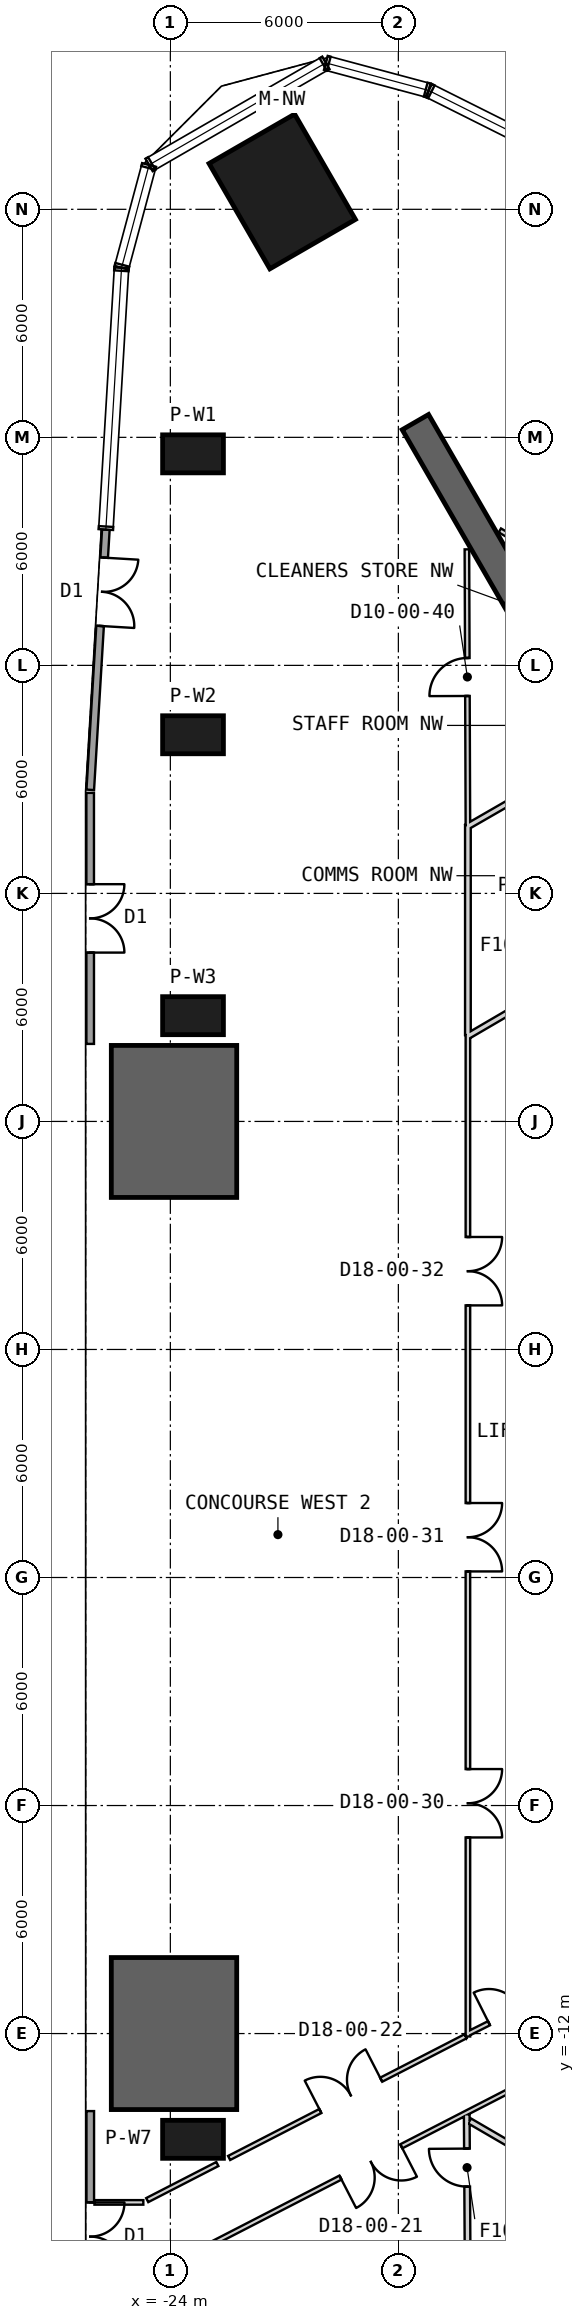
"""IFC4 building model, lengths in metres.
Left out: names, types, materials, properties, quantities, classifications, styles, units other than length and angle.
Written with IfcOpenShell. Run it as: python <this file> out.ifc"""

import sys

from ifc_helpers import new_model, si_unit, direction, frame, frame_2d, origin, origin_2d, place, context, subcontext, project, spatial, polyline, rectangle, outline, extrude, element, fill, save


model = new_model("IFC4")
c1 = context("Model", 3, precision=1e-05, world=origin(), true_north=direction((0.0, 1.0)))
c2 = subcontext(c1, "Body", "Model", "MODEL_VIEW")
j1 = project(units=[si_unit("LENGTHUNIT", "METRE"), si_unit("PLANEANGLEUNIT", "RADIAN")], contexts=[c1])
p1 = place(None, origin())
s1 = spatial("IfcSite", under=j1, at=p1, CompositionType="ELEMENT")
p2 = place(p1, origin())
s2 = spatial("IfcBuilding", under=s1, at=p2, CompositionType="ELEMENT")
p3 = place(p2, origin())
s3 = spatial("IfcBuildingStorey", under=s2, at=p3, CompositionType="ELEMENT", Elevation=0.0)
p4 = place(p3, frame((-21.056, 36.469, 0.0), z_axis=(0.0, 0.0, 1.0), x_axis=(-0.5, 0.866025403784, 0.0)))
e1 = element("IfcColumn", 1, at=p4, inside=s3, PredefinedType="COLUMN", context=c2, shape_type="SweptSolid", body=[
    extrude(rectangle(XDim=3.2, YDim=2.6, at=origin_2d()), origin(), (0.0, 0.0, 1.0), 9.0),
])
for number, where, z_axis, x_axis in (
    (2, (-23.403, 29.566, 0.0), (0.0, 0.0, 1.0), (-1.0, 0.0, 0.0)),
    (3, (-23.403, 22.174, 0.0), (0.0, 0.0, 1.0), (-1.0, 0.0, 0.0)),
    (4, (-23.403, 14.783, 0.0), (0.0, 0.0, 1.0), (-1.0, 0.0, 0.0)),
    (5, (-23.403, -14.783, 0.0), (0.0, 0.0, 1.0), (-1.0, 0.0, 0.0)),
):
    element("IfcColumn", number, at=place(p3, frame(where, z_axis=z_axis, x_axis=x_axis)), inside=s3, PredefinedType="COLUMN", context=c2, shape_type="SweptSolid", body=[
        extrude(rectangle(XDim=1.6, YDim=1.0, at=origin_2d()), origin(), (0.0, 0.0, 1.0), 9.0),
    ])
p5 = place(p3, frame((-10.575, 18.316, 0.0), z_axis=(0.0, 0.0, 1.0), x_axis=(-0.499996575515, 0.866027380903, 0.0)))
e6 = element("IfcWall", 6, at=p5, inside=s3, PredefinedType="SHEAR", context=c2, shape_type="SweptSolid", body=[
    extrude(rectangle(XDim=13.954, YDim=0.8, at=frame_2d((6.977, 0.0))), origin(), (0.0, 0.0, 1.0), 9.0),
])
p6 = place(p5, frame((2.05, 0.0, 0.0)))
e7 = element("IfcOpeningElement", 7, at=p6, cuts=e6, PredefinedType="OPENING", context=c2, shape_type="SweptSolid", body=[
    extrude(rectangle(XDim=1.4, YDim=2.4, at=frame_2d((0.7, 1.2))), frame((0.0, 0.41, 0.0), z_axis=(0.0, -1.0, 0.0), x_axis=(1.0, 0.0, 0.0)), (0.0, 0.0, 1.0), 0.82),
])
p7 = place(p3, origin())
e8 = element("IfcWall", 8, at=p7, inside=s3, PredefinedType="SHEAR", context=c2, shape_type="SweptSolid", body=[
    extrude(outline(polyline([(-25.553, 14.0), (-25.553, 10.0), (-22.253, 10.0), (-22.253, 14.0), (-25.553, 14.0)])), origin(), (0.0, 0.0, 1.0), 9.0),
])
p8 = place(p3, origin())
e9 = element("IfcWall", 9, at=p8, inside=s3, PredefinedType="SHEAR", context=c2, shape_type="SweptSolid", body=[
    extrude(outline(polyline([(-25.553, -10.0), (-25.553, -14.0), (-22.253, -14.0), (-22.253, -10.0), (-25.553, -10.0)])), origin(), (0.0, 0.0, 1.0), 9.0),
])
p9 = place(p3, frame((-26.11, 20.645, 0.0), z_axis=(0.0, 0.0, 1.0), x_axis=(7.3923489e-05, -0.999999997268, 0.0)))
e10 = element("IfcWall", 10, at=p9, inside=s3, PredefinedType="SOLIDWALL", context=c2, shape_type="SweptSolid", body=[
    extrude(rectangle(XDim=6.605, YDim=0.2, at=frame_2d((3.303, 0.0))), origin(), (0.0, 0.0, 1.0), 8.7),
])
p10 = place(p9, frame((2.403, 0.0, 0.0)))
e11 = element("IfcOpeningElement", 11, at=p10, cuts=e10, PredefinedType="OPENING", context=c2, shape_type="SweptSolid", body=[
    extrude(rectangle(XDim=1.8, YDim=2.4, at=frame_2d((0.9, 1.2))), frame((0.0, 0.11, 0.0), z_axis=(0.0, -1.0, 0.0), x_axis=(1.0, 0.0, 0.0)), (0.0, 0.0, 1.0), 0.22),
])
p11 = place(p3, frame((-26.107, -14.04, 0.0), z_axis=(0.0, 0.0, 1.0), x_axis=(7.3923489e-05, -0.999999997268, 0.0)))
e12 = element("IfcWall", 12, at=p11, inside=s3, PredefinedType="SOLIDWALL", context=c2, shape_type="SweptSolid", body=[
    extrude(rectangle(XDim=6.605, YDim=0.2, at=frame_2d((3.303, 0.0))), origin(), (0.0, 0.0, 1.0), 8.7),
])
p12 = place(p11, frame((2.403, 0.0, 0.0)))
e13 = element("IfcOpeningElement", 13, at=p12, cuts=e12, PredefinedType="OPENING", context=c2, shape_type="SweptSolid", body=[
    extrude(rectangle(XDim=1.8, YDim=2.4, at=frame_2d((0.9, 1.2))), frame((0.0, 0.11, 0.0), z_axis=(0.0, -1.0, 0.0), x_axis=(1.0, 0.0, 0.0)), (0.0, 0.0, 1.0), 0.22),
])
p13 = place(p3, frame((-25.697, 27.574, 0.0), z_axis=(0.0, 0.0, 1.0), x_axis=(-0.059817122555, -0.998209352716, 0.0)))
e14 = element("IfcWall", 14, at=p13, inside=s3, PredefinedType="SOLIDWALL", context=c2, shape_type="SweptSolid", body=[
    extrude(rectangle(XDim=6.861, YDim=0.2, at=frame_2d((3.43, 0.0))), origin(), (0.0, 0.0, 1.0), 8.7),
])
p14 = place(p13, frame((0.74, 0.0, 0.0)))
e15 = element("IfcOpeningElement", 15, at=p14, cuts=e14, PredefinedType="OPENING", context=c2, shape_type="SweptSolid", body=[
    extrude(rectangle(XDim=1.8, YDim=2.4, at=frame_2d((0.9, 1.2))), frame((0.0, 0.11, 0.0), z_axis=(0.0, -1.0, 0.0), x_axis=(1.0, 0.0, 0.0)), (0.0, 0.0, 1.0), 0.22),
])
p15 = place(p3, frame((-11.74, 16.832, 0.0), z_axis=(0.0, 0.0, 1.0), x_axis=(-0.863501067027, -0.504347010741, 0.0)))
e16 = element("IfcWall", 16, at=p15, inside=s3, PredefinedType="PLUMBINGWALL", context=c2, shape_type="SweptSolid", body=[
    extrude(rectangle(XDim=5.166, YDim=0.15, at=frame_2d((2.583, 0.0))), origin(), (0.0, 0.0, 1.0), 7.78),
])
p16 = place(p15, frame((1.977, 0.0, 0.0)))
e17 = element("IfcOpeningElement", 17, at=p16, cuts=e16, PredefinedType="OPENING", context=c2, shape_type="SweptSolid", body=[
    extrude(rectangle(XDim=1.0, YDim=2.1, at=frame_2d((0.5, 1.05))), frame((0.0, 0.085, 0.0), z_axis=(0.0, -1.0, 0.0), x_axis=(1.0, 0.0, 0.0)), (0.0, 0.0, 1.0), 0.17),
])
p17 = place(p3, frame((-16.2, -12.022, 0.0), z_axis=(0.0, 0.0, 1.0), x_axis=(0.893622341214, 0.448819686826, 0.0)))
e18 = element("IfcWall", 18, at=p17, inside=s3, PredefinedType="PARTITIONING", context=c2, shape_type="SweptSolid", body=[
    extrude(rectangle(XDim=2.917, YDim=0.12, at=frame_2d((1.458, 0.0))), origin(), (0.0, 0.0, 1.0), 8.7),
])
p18 = place(p17, frame((0.655, 0.0, 0.0)))
e19 = element("IfcOpeningElement", 19, at=p18, cuts=e18, PredefinedType="OPENING", context=c2, shape_type="SweptSolid", body=[
    extrude(rectangle(XDim=1.8, YDim=2.1, at=frame_2d((0.9, 1.05))), frame((0.0, 0.07, 0.0), z_axis=(0.0, -1.0, 0.0), x_axis=(1.0, 0.0, 0.0)), (0.0, 0.0, 1.0), 0.14),
])
p19 = place(p3, frame((-16.17, 14.273, 0.0), z_axis=(0.0, 0.0, 1.0), x_axis=(0.0, -1.0, 0.0)))
e20 = element("IfcWall", 20, at=p19, inside=s3, PredefinedType="PARTITIONING", context=c2, shape_type="SweptSolid", body=[
    extrude(rectangle(XDim=26.35, YDim=0.12, at=frame_2d((13.175, 0.0))), origin(), (0.0, 0.0, 1.0), 8.08),
])
p20 = place(p19, frame((19.314, 0.0, 0.0)))
e21 = element("IfcOpeningElement", 21, at=p20, cuts=e20, PredefinedType="OPENING", context=c2, shape_type="SweptSolid", body=[
    extrude(rectangle(XDim=1.8, YDim=2.1, at=frame_2d((0.9, 1.05))), frame((0.0, 0.07, 0.0), z_axis=(0.0, -1.0, 0.0), x_axis=(1.0, 0.0, 0.0)), (0.0, 0.0, 1.0), 0.14),
])
p21 = place(p19, frame((12.314, 0.0, 0.0)))
e22 = element("IfcOpeningElement", 22, at=p21, cuts=e20, PredefinedType="OPENING", context=c2, shape_type="SweptSolid", body=[
    extrude(rectangle(XDim=1.8, YDim=2.1, at=frame_2d((0.9, 1.05))), frame((0.0, 0.07, 0.0), z_axis=(0.0, -1.0, 0.0), x_axis=(1.0, 0.0, 0.0)), (0.0, 0.0, 1.0), 0.14),
])
p22 = place(p19, frame((5.314, 0.0, 0.0)))
e23 = element("IfcOpeningElement", 23, at=p22, cuts=e20, PredefinedType="OPENING", context=c2, shape_type="SweptSolid", body=[
    extrude(rectangle(XDim=1.8, YDim=2.1, at=frame_2d((0.9, 1.05))), frame((0.0, 0.07, 0.0), z_axis=(0.0, -1.0, 0.0), x_axis=(1.0, 0.0, 0.0)), (0.0, 0.0, 1.0), 0.14),
])
p23 = place(p3, frame((-15.329, 27.551, 0.0), z_axis=(0.0, 0.0, 1.0), x_axis=(0.863752019717, -0.503917104725, 0.0)))
e24 = element("IfcWall", 24, at=p23, inside=s3, PredefinedType="PARTITIONING", context=c2, shape_type="SweptSolid", body=[
    extrude(rectangle(XDim=5.6, YDim=0.12, at=frame_2d((2.8, 0.0))), origin(), (0.0, 0.0, 1.0), 8.7),
])
p24 = place(p23, frame((2.992, 0.0, 0.0)))
e25 = element("IfcOpeningElement", 25, at=p24, cuts=e24, PredefinedType="OPENING", context=c2, shape_type="SweptSolid", body=[
    extrude(rectangle(XDim=1.0, YDim=2.1, at=frame_2d((0.5, 1.05))), frame((0.0, 0.07, 0.0), z_axis=(0.0, -1.0, 0.0), x_axis=(1.0, 0.0, 0.0)), (0.0, 0.0, 1.0), 0.14),
])
p25 = place(p3, frame((-13.032, 21.572, 0.0), z_axis=(0.0, 0.0, 1.0), x_axis=(-0.866491166515, -0.499192406143, 0.0)))
e26 = element("IfcWall", 26, at=p25, inside=s3, PredefinedType="PLUMBINGWALL", context=c2, shape_type="SweptSolid", body=[
    extrude(rectangle(XDim=3.656, YDim=0.15, at=frame_2d((1.828, 0.0))), origin(), (0.0, 0.0, 1.0), 7.78),
])
p26 = place(p3, frame((-16.17, 14.273, 0.0), z_axis=(0.0, 0.0, 1.0), x_axis=(0.0, 1.0, 0.0)))
e27 = element("IfcWall", 27, at=p26, inside=s3, PredefinedType="PLUMBINGWALL", context=c2, shape_type="SweptSolid", body=[
    extrude(rectangle(XDim=5.521, YDim=0.15, at=frame_2d((2.761, 0.0))), origin(), (0.0, 0.0, 1.0), 7.88),
])
p27 = place(p3, frame((-16.17, 19.795, 0.0), z_axis=(0.0, 0.0, 1.0), x_axis=(-0.003632670279, 0.999993401832, 0.0)))
e28 = element("IfcWall", 28, at=p27, inside=s3, PredefinedType="PARTITIONING", context=c2, shape_type="SweptSolid", body=[
    extrude(rectangle(XDim=7.258, YDim=0.12, at=frame_2d((3.629, 0.0))), origin(), (0.0, 0.0, 1.0), 7.78),
])
p28 = place(p27, frame((3.4, 0.0, 0.0)))
e29 = element("IfcOpeningElement", 29, at=p28, cuts=e28, PredefinedType="OPENING", context=c2, shape_type="SweptSolid", body=[
    extrude(rectangle(XDim=1.0, YDim=2.1, at=frame_2d((0.5, 1.05))), frame((0.0, 0.07, 0.0), z_axis=(0.0, -1.0, 0.0), x_axis=(1.0, 0.0, 0.0)), (0.0, 0.0, 1.0), 0.14),
])
p29 = place(p3, frame((-16.17, -19.243, 0.0), z_axis=(0.0, 0.0, 1.0), x_axis=(-0.006010481517, 0.999981936893, 0.0)))
e30 = element("IfcWall", 30, at=p29, inside=s3, PredefinedType="PLUMBINGWALL", context=c2, shape_type="SweptSolid", body=[
    extrude(rectangle(XDim=5.118, YDim=0.15, at=frame_2d((2.559, 0.0))), origin(), (0.0, 0.0, 1.0), 7.88),
])
p30 = place(p29, frame((3.216, 0.0, 0.0)))
e31 = element("IfcOpeningElement", 31, at=p30, cuts=e30, PredefinedType="OPENING", context=c2, shape_type="SweptSolid", body=[
    extrude(rectangle(XDim=1.0, YDim=2.1, at=frame_2d((0.5, 1.05))), frame((0.0, 0.085, 0.0), z_axis=(0.0, -1.0, 0.0), x_axis=(1.0, 0.0, 0.0)), (0.0, 0.0, 1.0), 0.17),
])
p31 = place(p3, frame((-11.729, -16.86, 0.0), z_axis=(0.0, 0.0, 1.0), x_axis=(-0.864161643102, 0.503214322721, 0.0)))
e32 = element("IfcWall", 32, at=p31, inside=s3, PredefinedType="PLUMBINGWALL", context=c2, shape_type="SweptSolid", body=[
    extrude(rectangle(XDim=5.086, YDim=0.15, at=frame_2d((2.543, 0.0))), origin(), (0.0, 0.0, 1.0), 7.78),
])
p32 = place(p3, frame((-26.007, -16.443, 0.0), z_axis=(0.0, 0.0, 1.0), x_axis=(1.0, 0.0, 0.0)))
e33 = element("IfcWall", 33, at=p32, inside=s3, PredefinedType="PARTITIONING", context=c2, shape_type="SweptSolid", body=[
    extrude(rectangle(XDim=1.297, YDim=0.12, at=frame_2d((0.648, 0.0))), origin(), (0.0, 0.0, 1.0), 8.7),
])
p33 = place(p3, frame((-16.23, -12.071, 0.0), z_axis=(0.0, 0.0, 1.0), x_axis=(-0.889183605382, -0.457550561053, 0.0)))
e34 = element("IfcWall", 34, at=p33, inside=s3, PredefinedType="PARTITIONING", context=c2, shape_type="SweptSolid", body=[
    extrude(rectangle(XDim=6.999, YDim=0.12, at=frame_2d((3.5, 0.0))), origin(), (0.0, 0.0, 1.0), 8.7),
])
p34 = place(p33, frame((2.499, 0.0, 0.0)))
e35 = element("IfcOpeningElement", 35, at=p34, cuts=e34, PredefinedType="OPENING", context=c2, shape_type="SweptSolid", body=[
    extrude(rectangle(XDim=1.8, YDim=2.1, at=frame_2d((0.9, 1.05))), frame((0.0, 0.07, 0.0), z_axis=(0.0, -1.0, 0.0), x_axis=(1.0, 0.0, 0.0)), (0.0, 0.0, 1.0), 0.14),
])
p35 = place(p3, frame((-22.763, -15.433, 0.0), z_axis=(0.0, 0.0, 1.0), x_axis=(-0.88919210908, -0.457534034963, 0.0)))
e36 = element("IfcWall", 36, at=p35, inside=s3, PredefinedType="PARTITIONING", context=c2, shape_type="SweptSolid", body=[
    extrude(rectangle(XDim=2.076, YDim=0.12, at=frame_2d((1.038, 0.0))), origin(), (0.0, 0.0, 1.0), 8.7),
])
p36 = place(p3, frame((-24.302, -18.249, 0.0), z_axis=(0.0, 0.0, 1.0), x_axis=(0.889186002608, 0.45754590236, 0.0)))
e37 = element("IfcWall", 37, at=p36, inside=s3, PredefinedType="PARTITIONING", context=c2, shape_type="SweptSolid", body=[
    extrude(rectangle(XDim=12.543, YDim=0.12, at=frame_2d((6.272, 0.0))), origin(), (0.0, 0.0, 1.0), 7.88),
])
p37 = place(p36, frame((5.375, 0.0, 0.0)))
e38 = element("IfcOpeningElement", 38, at=p37, cuts=e37, PredefinedType="OPENING", context=c2, shape_type="SweptSolid", body=[
    extrude(rectangle(XDim=1.8, YDim=2.1, at=frame_2d((0.9, 1.05))), frame((0.0, 0.07, 0.0), z_axis=(0.0, -1.0, 0.0), x_axis=(1.0, 0.0, 0.0)), (0.0, 0.0, 1.0), 0.14),
])
p38 = place(p10, frame((1.8, 0.0, 0.0), z_axis=(0.0, 0.0, 1.0), x_axis=(-1.0, 0.0, 0.0)))
e39 = element("IfcDoor", 39, at=p38, inside=s3, OperationType="SINGLE_SWING_RIGHT", PredefinedType="DOOR", context=c2, shape_type="SweptSolid", body=[
    extrude(rectangle(XDim=1.8, YDim=2.4, at=frame_2d((0.9, 1.2))), frame((0.0, 0.025, 0.0), z_axis=(0.0, -1.0, 0.0), x_axis=(1.0, 0.0, 0.0)), (0.0, 0.0, 1.0), 0.05),
])
fill(e11, e39)
p39 = place(p12, frame((1.8, 0.0, 0.0), z_axis=(0.0, 0.0, 1.0), x_axis=(-1.0, 0.0, 0.0)))
e40 = element("IfcDoor", 40, at=p39, inside=s3, OperationType="SINGLE_SWING_RIGHT", PredefinedType="DOOR", context=c2, shape_type="SweptSolid", body=[
    extrude(rectangle(XDim=1.8, YDim=2.4, at=frame_2d((0.9, 1.2))), frame((0.0, 0.025, 0.0), z_axis=(0.0, -1.0, 0.0), x_axis=(1.0, 0.0, 0.0)), (0.0, 0.0, 1.0), 0.05),
])
fill(e13, e40)
p40 = place(p14, frame((1.8, 0.0, 0.0), z_axis=(0.0, 0.0, 1.0), x_axis=(-1.0, 0.0, 0.0)))
e41 = element("IfcDoor", 41, at=p40, inside=s3, OperationType="SINGLE_SWING_RIGHT", PredefinedType="DOOR", context=c2, shape_type="SweptSolid", body=[
    extrude(rectangle(XDim=1.8, YDim=2.4, at=frame_2d((0.9, 1.2))), frame((0.0, 0.025, 0.0), z_axis=(0.0, -1.0, 0.0), x_axis=(1.0, 0.0, 0.0)), (0.0, 0.0, 1.0), 0.05),
])
fill(e15, e41)
p41 = place(p37, origin())
e42 = element("IfcDoor", 42, at=p41, inside=s3, OperationType="DOUBLE_DOOR_SINGLE_SWING", PredefinedType="NOTDEFINED", context=c2, shape_type="SweptSolid", body=[
    extrude(rectangle(XDim=1.8, YDim=2.1, at=frame_2d((0.9, 1.05))), frame((0.0, 0.025, 0.0), z_axis=(0.0, -1.0, 0.0), x_axis=(1.0, 0.0, 0.0)), (0.0, 0.0, 1.0), 0.05),
])
fill(e38, e42)
p42 = place(p34, origin())
e43 = element("IfcDoor", 43, at=p42, inside=s3, OperationType="DOUBLE_DOOR_SINGLE_SWING", PredefinedType="NOTDEFINED", context=c2, shape_type="SweptSolid", body=[
    extrude(rectangle(XDim=1.8, YDim=2.1, at=frame_2d((0.9, 1.05))), frame((0.0, 0.025, 0.0), z_axis=(0.0, -1.0, 0.0), x_axis=(1.0, 0.0, 0.0)), (0.0, 0.0, 1.0), 0.05),
])
fill(e35, e43)
p43 = place(p18, origin())
e44 = element("IfcDoor", 44, at=p43, inside=s3, OperationType="DOUBLE_DOOR_SINGLE_SWING", PredefinedType="NOTDEFINED", context=c2, shape_type="SweptSolid", body=[
    extrude(rectangle(XDim=1.8, YDim=2.1, at=frame_2d((0.9, 1.05))), frame((0.0, 0.025, 0.0), z_axis=(0.0, -1.0, 0.0), x_axis=(1.0, 0.0, 0.0)), (0.0, 0.0, 1.0), 0.05),
])
fill(e19, e44)
p44 = place(p20, origin())
e45 = element("IfcDoor", 45, at=p44, inside=s3, OperationType="DOUBLE_DOOR_SINGLE_SWING", PredefinedType="NOTDEFINED", context=c2, shape_type="SweptSolid", body=[
    extrude(rectangle(XDim=1.8, YDim=2.1, at=frame_2d((0.9, 1.05))), frame((0.0, 0.025, 0.0), z_axis=(0.0, -1.0, 0.0), x_axis=(1.0, 0.0, 0.0)), (0.0, 0.0, 1.0), 0.05),
])
fill(e21, e45)
p45 = place(p21, origin())
e46 = element("IfcDoor", 46, at=p45, inside=s3, OperationType="DOUBLE_DOOR_SINGLE_SWING", PredefinedType="NOTDEFINED", context=c2, shape_type="SweptSolid", body=[
    extrude(rectangle(XDim=1.8, YDim=2.1, at=frame_2d((0.9, 1.05))), frame((0.0, 0.025, 0.0), z_axis=(0.0, -1.0, 0.0), x_axis=(1.0, 0.0, 0.0)), (0.0, 0.0, 1.0), 0.05),
])
fill(e22, e46)
p46 = place(p22, origin())
e47 = element("IfcDoor", 47, at=p46, inside=s3, OperationType="DOUBLE_DOOR_SINGLE_SWING", PredefinedType="NOTDEFINED", context=c2, shape_type="SweptSolid", body=[
    extrude(rectangle(XDim=1.8, YDim=2.1, at=frame_2d((0.9, 1.05))), frame((0.0, 0.025, 0.0), z_axis=(0.0, -1.0, 0.0), x_axis=(1.0, 0.0, 0.0)), (0.0, 0.0, 1.0), 0.05),
])
fill(e23, e47)
p47 = place(p28, origin())
e48 = element("IfcDoor", 48, at=p47, inside=s3, OperationType="SINGLE_SWING_LEFT", PredefinedType="NOTDEFINED", context=c2, shape_type="SweptSolid", body=[
    extrude(rectangle(XDim=1.0, YDim=2.1, at=frame_2d((0.5, 1.05))), frame((0.0, 0.025, 0.0), z_axis=(0.0, -1.0, 0.0), x_axis=(1.0, 0.0, 0.0)), (0.0, 0.0, 1.0), 0.05),
])
fill(e29, e48)
p48 = place(p30, origin())
e49 = element("IfcDoor", 49, at=p48, inside=s3, OperationType="SINGLE_SWING_RIGHT", PredefinedType="USERDEFINED", context=c2, shape_type="SweptSolid", body=[
    extrude(rectangle(XDim=1.0, YDim=2.1, at=frame_2d((0.5, 1.05))), frame((0.0, 0.025, 0.0), z_axis=(0.0, -1.0, 0.0), x_axis=(1.0, 0.0, 0.0)), (0.0, 0.0, 1.0), 0.05),
])
fill(e31, e49)
save(model, sys.argv[1])
